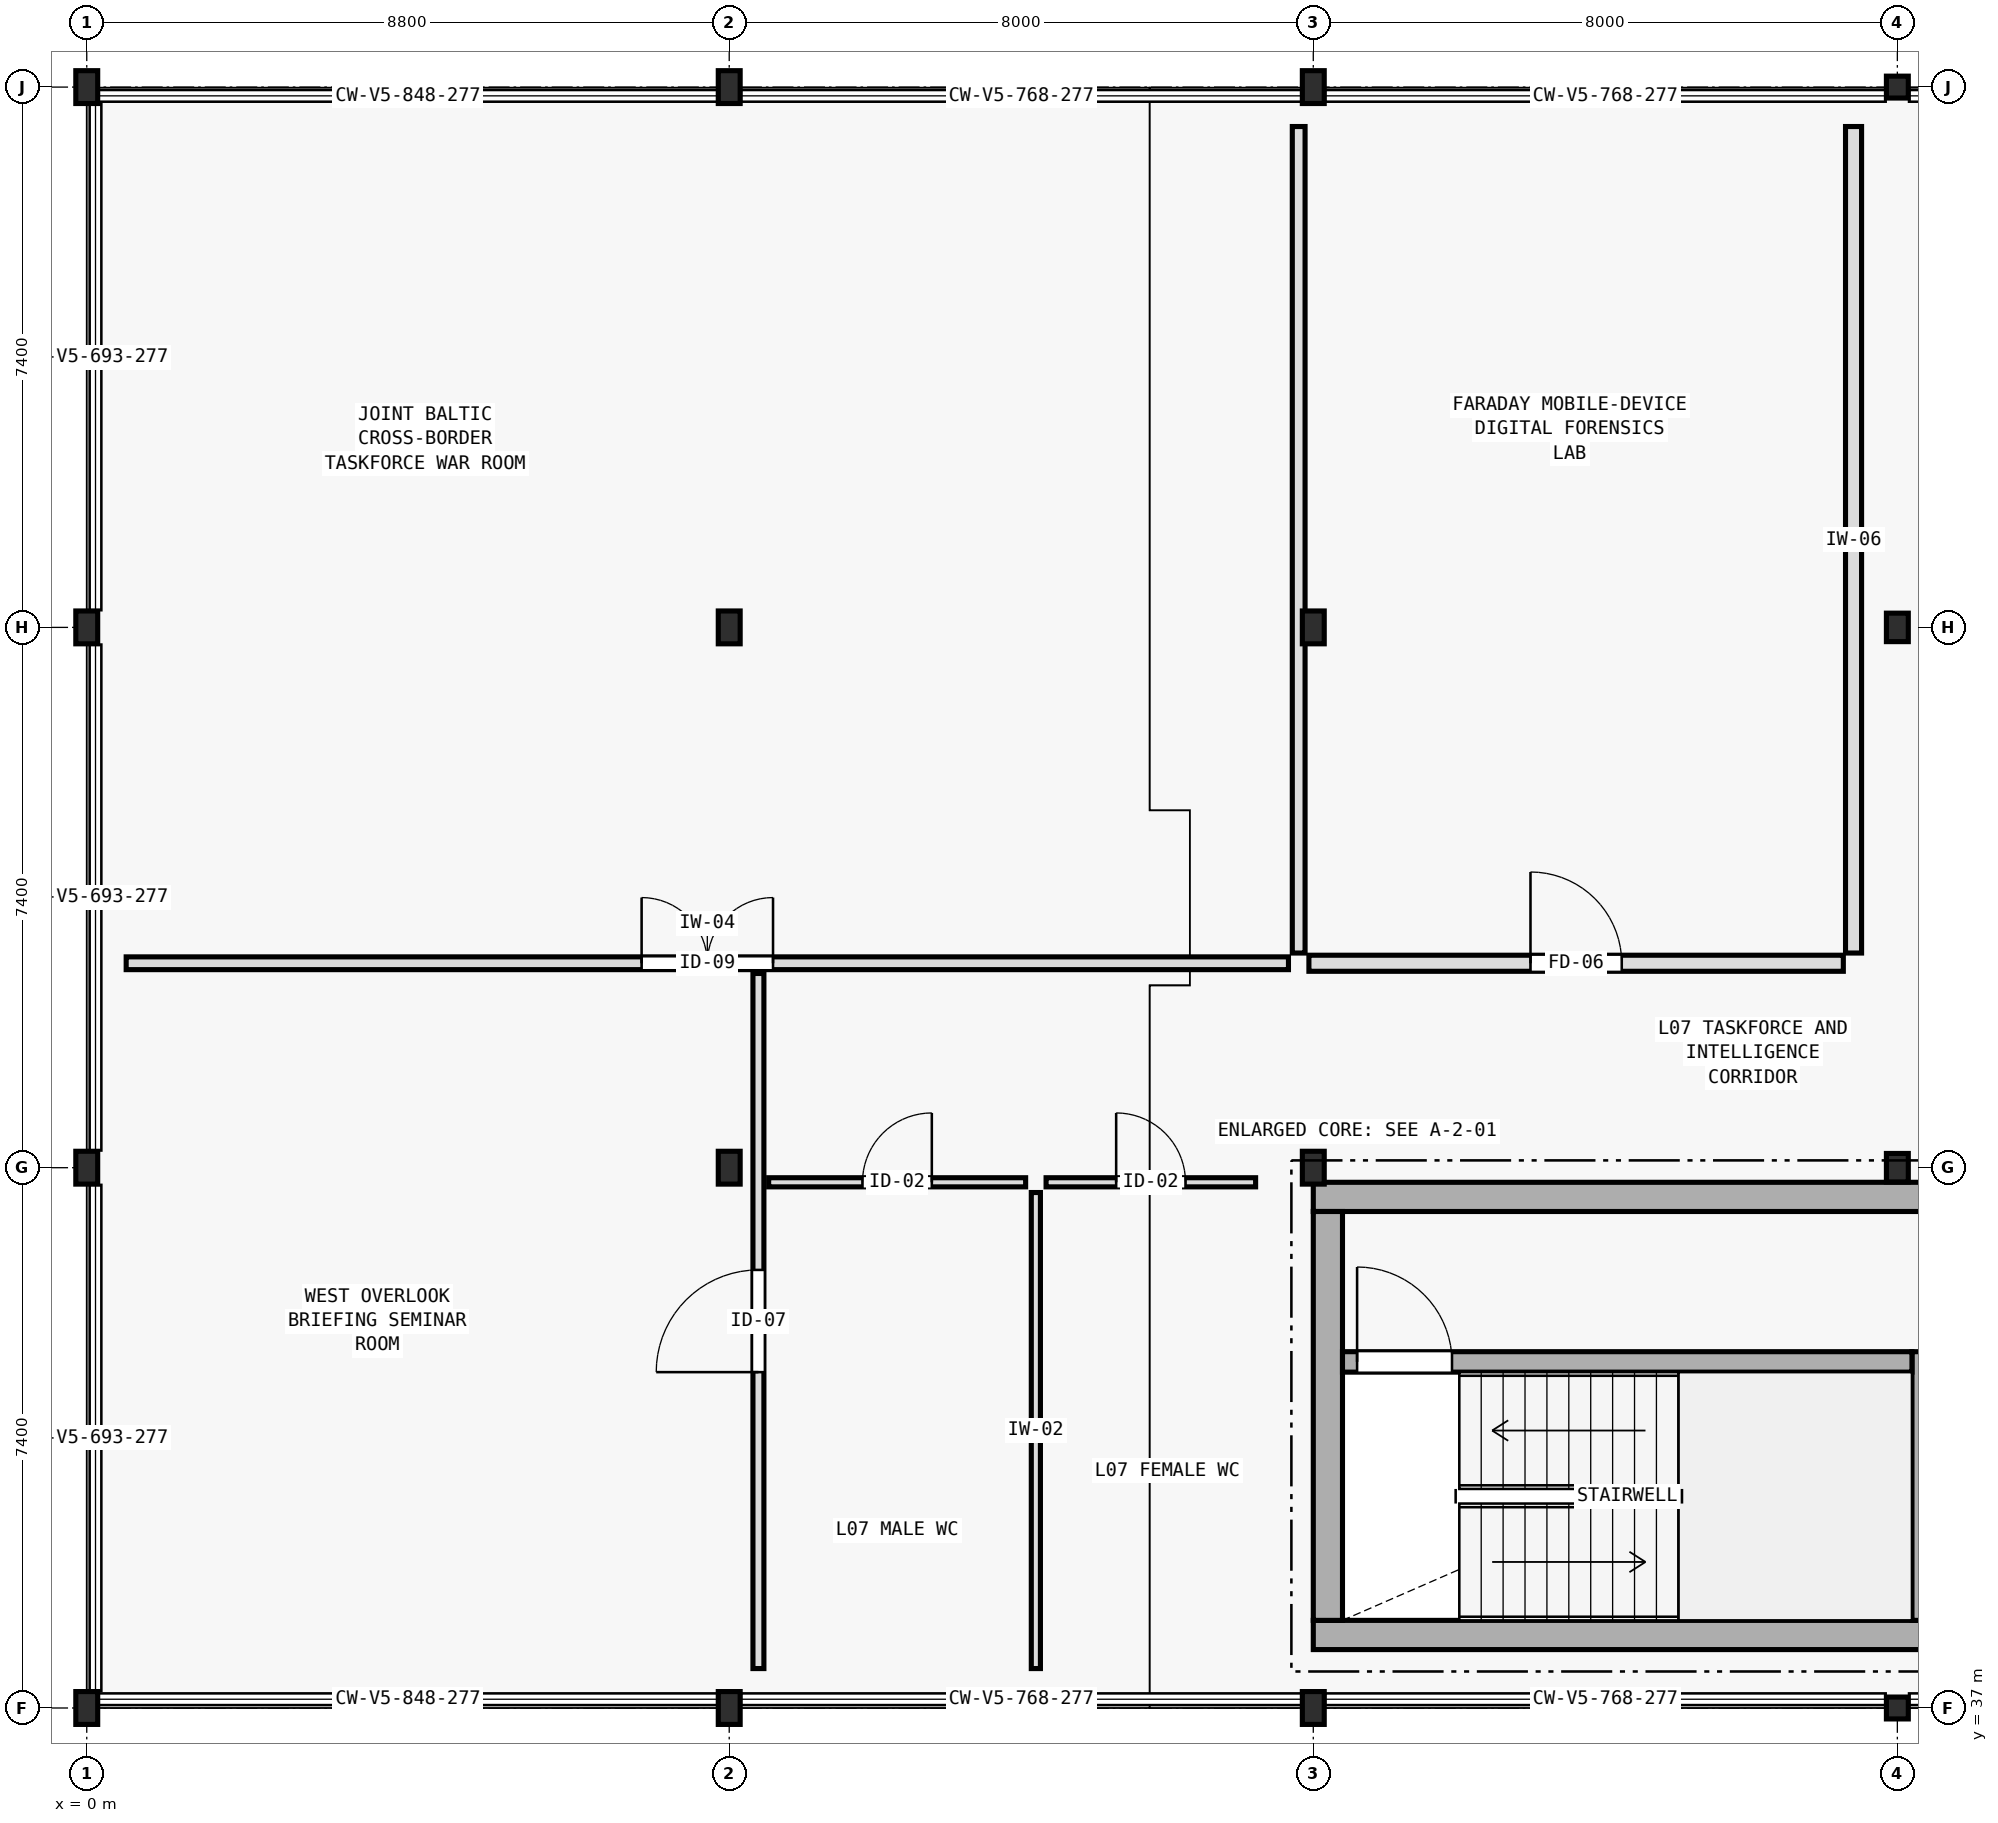
"""IFC4 building model, lengths in metres.
Left out: names, types, materials, properties, quantities, classifications, styles, units other than length and angle.
Written with IfcOpenShell. Run it as: python <this file> out.ifc"""

import sys

from ifc_helpers import new_model, si_unit, direction, frame, frame_2d, origin, origin_2d, place, context, subcontext, project, spatial, rectangle, i_section, extrude, element, fill, save


model = new_model("IFC4")
c1 = context("Model", 3, precision=1e-05, world=origin(), true_north=direction((0.0, 1.0)))
c2 = subcontext(c1, "Body", "Model", "MODEL_VIEW")
j1 = project(units=[si_unit("LENGTHUNIT", "METRE"), si_unit("PLANEANGLEUNIT", "RADIAN")], contexts=[c1])
p1 = place(None, origin())
s1 = spatial("IfcSite", under=j1, at=p1, CompositionType="ELEMENT")
p2 = place(p1, origin())
s2 = spatial("IfcBuilding", under=s1, at=p2, CompositionType="ELEMENT")
p3 = place(p2, frame((0.0, 0.0, 27.2)))
s3 = spatial("IfcBuildingStorey", under=s2, at=p3, CompositionType="ELEMENT", Elevation=27.2)
p4 = place(p3, frame((16.8, 38.0, 0.0), z_axis=(0.0, 0.0, 1.0), x_axis=(1.0, 0.0, 0.0)))
e1 = element("IfcWall", 1, at=p4, inside=s3, PredefinedType="SHEAR", context=c2, shape_type="SweptSolid", body=[
    extrude(rectangle(XDim=16.4, YDim=0.4, at=frame_2d((8.2, 0.0))), origin(), (0.0, 0.0, 1.0), 3.895),
])
p5 = place(p3, frame((16.8, 44.0, 0.0), z_axis=(0.0, 0.0, 1.0), x_axis=(1.0, 0.0, 0.0)))
e2 = element("IfcWall", 2, at=p5, inside=s3, PredefinedType="SHEAR", context=c2, shape_type="SweptSolid", body=[
    extrude(rectangle(XDim=16.4, YDim=0.4, at=frame_2d((8.2, 0.0))), origin(), (0.0, 0.0, 1.0), 3.895),
])
p6 = place(p5, frame((10.3, 0.0, 0.0)))
e3 = element("IfcOpeningElement", 3, at=p6, cuts=e2, PredefinedType="OPENING", context=c2, shape_type="SweptSolid", body=[
    extrude(rectangle(XDim=1.6, YDim=2.2, at=frame_2d((0.8, 1.1))), frame((0.0, 0.21, 0.0), z_axis=(0.0, -1.0, 0.0), x_axis=(1.0, 0.0, 0.0)), (0.0, 0.0, 1.0), 0.42),
])
p7 = place(p3, frame((17.0, 38.2, 0.0), z_axis=(0.0, 0.0, 1.0), x_axis=(0.0, 1.0, 0.0)))
e4 = element("IfcWall", 4, at=p7, inside=s3, PredefinedType="SHEAR", context=c2, shape_type="SweptSolid", body=[
    extrude(rectangle(XDim=5.6, YDim=0.4, at=frame_2d((2.8, 0.0))), origin(), (0.0, 0.0, 1.0), 3.895),
])
p8 = place(p3, frame((25.14, 38.2, 0.0), z_axis=(0.0, 0.0, 1.0), x_axis=(0.0, 1.0, 0.0)))
e5 = element("IfcWall", 5, at=p8, inside=s3, PredefinedType="SHEAR", context=c2, shape_type="SweptSolid", body=[
    extrude(rectangle(XDim=3.68, YDim=0.28, at=frame_2d((1.84, 0.0))), origin(), (0.0, 0.0, 1.0), 3.895),
])
p9 = place(p3, frame((17.2, 41.74, 0.0), z_axis=(0.0, 0.0, 1.0), x_axis=(1.0, 0.0, 0.0)))
e6 = element("IfcWall", 6, at=p9, inside=s3, PredefinedType="SHEAR", context=c2, shape_type="SweptSolid", body=[
    extrude(rectangle(XDim=7.8, YDim=0.28, at=frame_2d((3.9, 0.0))), origin(), (0.0, 0.0, 1.0), 3.895),
])
p10 = place(p9, frame((0.2, 0.0, 0.0)))
e7 = element("IfcOpeningElement", 7, at=p10, cuts=e6, PredefinedType="OPENING", context=c2, shape_type="SweptSolid", body=[
    extrude(rectangle(XDim=1.3, YDim=2.2, at=frame_2d((0.65, 1.1))), frame((0.0, 0.15, 0.0), z_axis=(0.0, -1.0, 0.0), x_axis=(1.0, 0.0, 0.0)), (0.0, 0.0, 1.0), 0.3),
])
for number, where, z_axis, x_axis in (
    (8, (0.0, 37.0, 0.0), (0.0, 0.0, 1.0), (1.0, 0.0, 0.0)),
    (9, (0.0, 44.4, 0.0), (0.0, 0.0, 1.0), (1.0, 0.0, 0.0)),
    (10, (0.0, 51.8, 0.0), (0.0, 0.0, 1.0), (1.0, 0.0, 0.0)),
    (11, (0.0, 59.2, 0.0), (0.0, 0.0, 1.0), (1.0, 0.0, 0.0)),
    (12, (8.8, 37.0, 0.0), (0.0, 0.0, 1.0), (1.0, 0.0, 0.0)),
    (13, (8.8, 44.4, 0.0), (0.0, 0.0, 1.0), (1.0, 0.0, 0.0)),
    (14, (8.8, 51.8, 0.0), (0.0, 0.0, 1.0), (1.0, 0.0, 0.0)),
    (15, (8.8, 59.2, 0.0), (0.0, 0.0, 1.0), (1.0, 0.0, 0.0)),
    (16, (16.8, 37.0, 0.0), (0.0, 0.0, 1.0), (1.0, 0.0, 0.0)),
    (17, (16.8, 44.4, 0.0), (0.0, 0.0, 1.0), (1.0, 0.0, 0.0)),
    (18, (16.8, 51.8, 0.0), (0.0, 0.0, 1.0), (1.0, 0.0, 0.0)),
    (19, (16.8, 59.2, 0.0), (0.0, 0.0, 1.0), (1.0, 0.0, 0.0)),
):
    element("IfcColumn", number, at=place(p3, frame(where, z_axis=z_axis, x_axis=x_axis)), inside=s3, PredefinedType="COLUMN", context=c2, shape_type="SweptSolid", body=[
        extrude(i_section(OverallWidth=0.3, OverallDepth=0.45, WebThickness=0.014, FlangeThickness=0.026, FilletRadius=0.027, at=origin_2d()), origin(), (0.0, 0.0, 1.0), 3.9),
    ])
p11 = place(p3, frame((24.8, 37.0, 0.0), z_axis=(0.0, 0.0, 1.0), x_axis=(1.0, 0.0, 0.0)))
e20 = element("IfcColumn", 20, at=p11, inside=s3, PredefinedType="COLUMN", context=c2, shape_type="SweptSolid", body=[
    extrude(i_section(OverallWidth=0.3, OverallDepth=0.3, WebThickness=0.011, FlangeThickness=0.019, FilletRadius=0.027, at=origin_2d()), origin(), (0.0, 0.0, 1.0), 3.9),
])
for number, where, z_axis, x_axis in (
    (21, (24.8, 44.4, 0.0), (0.0, 0.0, 1.0), (1.0, 0.0, 0.0)),
    (22, (24.8, 51.8, 0.0), (0.0, 0.0, 1.0), (1.0, 0.0, 0.0)),
):
    element("IfcColumn", number, at=place(p3, frame(where, z_axis=z_axis, x_axis=x_axis)), inside=s3, PredefinedType="COLUMN", context=c2, shape_type="SweptSolid", body=[
        extrude(i_section(OverallWidth=0.3, OverallDepth=0.39, WebThickness=0.011, FlangeThickness=0.019, FilletRadius=0.027, at=origin_2d()), origin(), (0.0, 0.0, 1.0), 3.9),
    ])
p12 = place(p3, frame((24.8, 59.2, 0.0), z_axis=(0.0, 0.0, 1.0), x_axis=(1.0, 0.0, 0.0)))
e23 = element("IfcColumn", 23, at=p12, inside=s3, PredefinedType="COLUMN", context=c2, shape_type="SweptSolid", body=[
    extrude(i_section(OverallWidth=0.3, OverallDepth=0.3, WebThickness=0.011, FlangeThickness=0.019, FilletRadius=0.027, at=origin_2d()), origin(), (0.0, 0.0, 1.0), 3.9),
])
p13 = place(p3, frame((0.54, 47.2, 0.0), z_axis=(0.0, 0.0, 1.0), x_axis=(1.0, 0.0, 0.0)))
e24 = element("IfcWall", 24, at=p13, inside=s3, PredefinedType="PARTITIONING", context=c2, shape_type="SweptSolid", body=[
    extrude(rectangle(XDim=15.92, YDim=0.175, at=frame_2d((7.96, 0.0))), origin(), (0.0, 0.0, 1.0), 3.26),
])
p14 = place(p13, frame((7.06, 0.0, 0.0)))
e25 = element("IfcOpeningElement", 25, at=p14, cuts=e24, PredefinedType="OPENING", context=c2, shape_type="SweptSolid", body=[
    extrude(rectangle(XDim=1.8, YDim=2.3, at=frame_2d((0.9, 1.15))), frame((0.0, 0.098, 0.0), z_axis=(0.0, -1.0, 0.0), x_axis=(1.0, 0.0, 0.0)), (0.0, 0.0, 1.0), 0.195),
])
p15 = place(p3, frame((16.6, 47.34, 0.0), z_axis=(0.0, 0.0, 1.0), x_axis=(0.0, 1.0, 0.0)))
e26 = element("IfcWall", 26, at=p15, inside=s3, PredefinedType="PARTITIONING", context=c2, shape_type="SweptSolid", body=[
    extrude(rectangle(XDim=11.32, YDim=0.175, at=frame_2d((5.66, 0.0))), origin(), (0.0, 0.0, 1.0), 2.76),
])
p16 = place(p3, frame((16.74, 47.2, 0.0), z_axis=(0.0, 0.0, 1.0), x_axis=(1.0, 0.0, 0.0)))
e27 = element("IfcWall", 27, at=p16, inside=s3, PredefinedType="PLUMBINGWALL", context=c2, shape_type="SweptSolid", body=[
    extrude(rectangle(XDim=7.32, YDim=0.22, at=frame_2d((3.66, 0.0))), origin(), (0.0, 0.0, 1.0), 3.26),
])
p17 = place(p16, frame((3.035, 0.0, 0.0)))
e28 = element("IfcOpeningElement", 28, at=p17, cuts=e27, PredefinedType="OPENING", context=c2, shape_type="SweptSolid", body=[
    extrude(rectangle(XDim=1.25, YDim=2.3, at=frame_2d((0.625, 1.15))), frame((0.0, 0.12, 0.0), z_axis=(0.0, -1.0, 0.0), x_axis=(1.0, 0.0, 0.0)), (0.0, 0.0, 1.0), 0.24),
])
p18 = place(p3, frame((24.2, 47.34, 0.0), z_axis=(0.0, 0.0, 1.0), x_axis=(0.0, 1.0, 0.0)))
e29 = element("IfcWall", 29, at=p18, inside=s3, PredefinedType="PLUMBINGWALL", context=c2, shape_type="SweptSolid", body=[
    extrude(rectangle(XDim=11.32, YDim=0.22, at=frame_2d((5.66, 0.0))), origin(), (0.0, 0.0, 1.0), 2.76),
])
p19 = place(p3, frame((9.2, 37.54, 0.0), z_axis=(0.0, 0.0, 1.0), x_axis=(0.0, 1.0, 0.0)))
e30 = element("IfcWall", 30, at=p19, inside=s3, PredefinedType="PARTITIONING", context=c2, shape_type="SweptSolid", body=[
    extrude(rectangle(XDim=9.52, YDim=0.15, at=frame_2d((4.76, 0.0))), origin(), (0.0, 0.0, 1.0), 2.76),
])
p20 = place(p19, frame((4.06, 0.0, 0.0)))
e31 = element("IfcOpeningElement", 31, at=p20, cuts=e30, PredefinedType="OPENING", context=c2, shape_type="SweptSolid", body=[
    extrude(rectangle(XDim=1.4, YDim=2.2, at=frame_2d((0.7, 1.1))), frame((0.0, 0.085, 0.0), z_axis=(0.0, -1.0, 0.0), x_axis=(1.0, 0.0, 0.0)), (0.0, 0.0, 1.0), 0.17),
])
p21 = place(p3, frame((9.34, 44.2, 0.0), z_axis=(0.0, 0.0, 1.0), x_axis=(1.0, 0.0, 0.0)))
e32 = element("IfcWall", 32, at=p21, inside=s3, PredefinedType="PARTITIONING", context=c2, shape_type="SweptSolid", body=[
    extrude(rectangle(XDim=3.52, YDim=0.125, at=frame_2d((1.76, 0.0))), origin(), (0.0, 0.0, 1.0), 2.76),
])
p22 = place(p21, frame((1.285, 0.0, 0.0)))
e33 = element("IfcOpeningElement", 33, at=p22, cuts=e32, PredefinedType="OPENING", context=c2, shape_type="SweptSolid", body=[
    extrude(rectangle(XDim=0.95, YDim=2.1, at=frame_2d((0.475, 1.05))), frame((0.0, 0.073, 0.0), z_axis=(0.0, -1.0, 0.0), x_axis=(1.0, 0.0, 0.0)), (0.0, 0.0, 1.0), 0.145),
])
p23 = place(p3, frame((13.0, 37.54, 0.0), z_axis=(0.0, 0.0, 1.0), x_axis=(0.0, 1.0, 0.0)))
e34 = element("IfcWall", 34, at=p23, inside=s3, PredefinedType="PARTITIONING", context=c2, shape_type="SweptSolid", body=[
    extrude(rectangle(XDim=6.52, YDim=0.125, at=frame_2d((3.26, 0.0))), origin(), (0.0, 0.0, 1.0), 3.57),
])
p24 = place(p3, frame((13.14, 44.2, 0.0), z_axis=(0.0, 0.0, 1.0), x_axis=(1.0, 0.0, 0.0)))
e35 = element("IfcWall", 35, at=p24, inside=s3, PredefinedType="PARTITIONING", context=c2, shape_type="SweptSolid", body=[
    extrude(rectangle(XDim=2.87, YDim=0.125, at=frame_2d((1.435, 0.0))), origin(), (0.0, 0.0, 1.0), 2.76),
])
p25 = place(p24, frame((0.96, 0.0, 0.0)))
e36 = element("IfcOpeningElement", 36, at=p25, cuts=e35, PredefinedType="OPENING", context=c2, shape_type="SweptSolid", body=[
    extrude(rectangle(XDim=0.95, YDim=2.1, at=frame_2d((0.475, 1.05))), frame((0.0, 0.073, 0.0), z_axis=(0.0, -1.0, 0.0), x_axis=(1.0, 0.0, 0.0)), (0.0, 0.0, 1.0), 0.145),
])
p26 = place(p10, origin())
e37 = element("IfcDoor", 37, at=p26, inside=s3, OperationType="SINGLE_SWING_LEFT", PredefinedType="DOOR", context=c2, shape_type="SweptSolid", body=[
    extrude(rectangle(XDim=1.3, YDim=2.2, at=frame_2d((0.65, 1.1))), frame((0.0, 0.025, 0.0), z_axis=(0.0, -1.0, 0.0), x_axis=(1.0, 0.0, 0.0)), (0.0, 0.0, 1.0), 0.05),
])
fill(e7, e37)
p27 = place(p14, origin())
e38 = element("IfcDoor", 38, at=p27, inside=s3, OperationType="DOUBLE_DOOR_SINGLE_SWING", PredefinedType="DOOR", context=c2, shape_type="SweptSolid", body=[
    extrude(rectangle(XDim=1.8, YDim=2.3, at=frame_2d((0.9, 1.15))), frame((0.0, 0.025, 0.0), z_axis=(0.0, -1.0, 0.0), x_axis=(1.0, 0.0, 0.0)), (0.0, 0.0, 1.0), 0.05),
])
fill(e25, e38)
p28 = place(p17, origin())
e39 = element("IfcDoor", 39, at=p28, inside=s3, OperationType="SINGLE_SWING_LEFT", PredefinedType="DOOR", context=c2, shape_type="SweptSolid", body=[
    extrude(rectangle(XDim=1.25, YDim=2.3, at=frame_2d((0.625, 1.15))), frame((0.0, 0.025, 0.0), z_axis=(0.0, -1.0, 0.0), x_axis=(1.0, 0.0, 0.0)), (0.0, 0.0, 1.0), 0.05),
])
fill(e28, e39)
p29 = place(p20, origin())
e40 = element("IfcDoor", 40, at=p29, inside=s3, OperationType="SINGLE_SWING_LEFT", PredefinedType="DOOR", context=c2, shape_type="SweptSolid", body=[
    extrude(rectangle(XDim=1.4, YDim=2.2, at=frame_2d((0.7, 1.1))), frame((0.0, 0.025, 0.0), z_axis=(0.0, -1.0, 0.0), x_axis=(1.0, 0.0, 0.0)), (0.0, 0.0, 1.0), 0.05),
])
fill(e31, e40)
p30 = place(p22, origin())
e41 = element("IfcDoor", 41, at=p30, inside=s3, OperationType="SINGLE_SWING_RIGHT", PredefinedType="DOOR", context=c2, shape_type="SweptSolid", body=[
    extrude(rectangle(XDim=0.95, YDim=2.1, at=frame_2d((0.475, 1.05))), frame((0.0, 0.025, 0.0), z_axis=(0.0, -1.0, 0.0), x_axis=(1.0, 0.0, 0.0)), (0.0, 0.0, 1.0), 0.05),
])
fill(e33, e41)
p31 = place(p25, origin())
e42 = element("IfcDoor", 42, at=p31, inside=s3, OperationType="SINGLE_SWING_LEFT", PredefinedType="DOOR", context=c2, shape_type="SweptSolid", body=[
    extrude(rectangle(XDim=0.95, YDim=2.1, at=frame_2d((0.475, 1.05))), frame((0.0, 0.025, 0.0), z_axis=(0.0, -1.0, 0.0), x_axis=(1.0, 0.0, 0.0)), (0.0, 0.0, 1.0), 0.05),
])
fill(e36, e42)
save(model, sys.argv[1])
